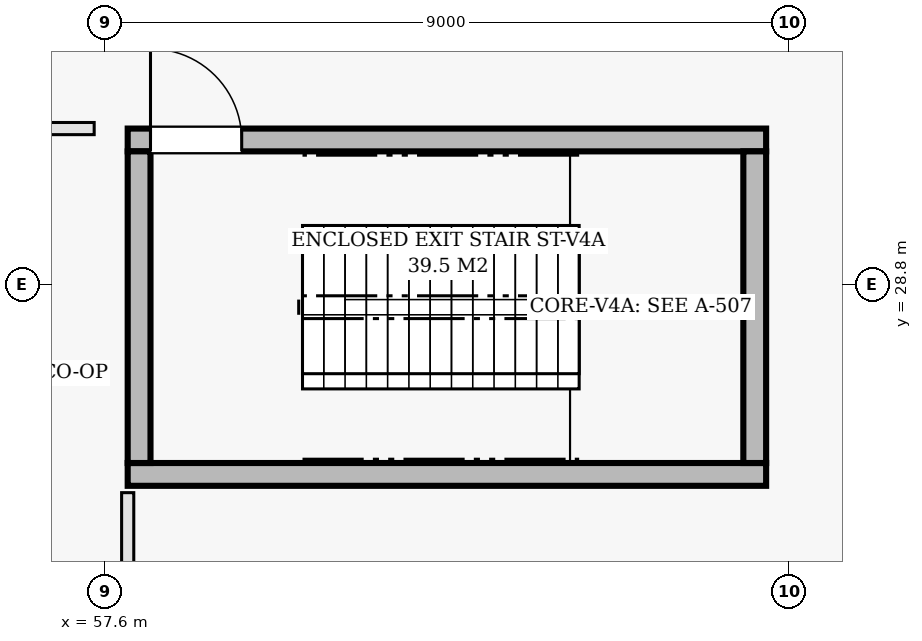
"""IFC4 building model, lengths in metres.
Left out: names, types, materials, properties, quantities, classifications, styles, units other than length and angle.
Written with IfcOpenShell. Run it as: python <this file> out.ifc"""

import sys

from ifc_helpers import new_model, si_unit, direction, frame, frame_2d, origin, place, context, subcontext, project, spatial, rectangle, extrude, element, fill, save


model = new_model("IFC4")
c1 = context("Model", 3, precision=1e-05, world=origin(), true_north=direction((0.0, 1.0)))
c2 = subcontext(c1, "Body", "Model", "MODEL_VIEW")
j1 = project(units=[si_unit("LENGTHUNIT", "METRE"), si_unit("PLANEANGLEUNIT", "RADIAN")], contexts=[c1])
p1 = place(None, origin())
s1 = spatial("IfcSite", under=j1, at=p1, CompositionType="ELEMENT")
p2 = place(p1, origin())
s2 = spatial("IfcBuilding", under=s1, at=p2, CompositionType="ELEMENT")
p3 = place(p2, origin())
s3 = spatial("IfcBuildingStorey", under=s2, at=p3, CompositionType="ELEMENT", Elevation=0.0)
p4 = place(p3, frame((57.9, 26.3, 0.0), z_axis=(0.0, 0.0, 1.0), x_axis=(1.0, 0.0, 0.0)))
e1 = element("IfcWall", 1, at=p4, inside=s3, PredefinedType="SHEAR", context=c2, shape_type="SweptSolid", body=[
    extrude(rectangle(XDim=8.4, YDim=0.3, at=frame_2d((4.2, 0.0))), origin(), (0.0, 0.0, 1.0), 4.52),
])
p5 = place(p3, frame((57.9, 30.7, 0.0), z_axis=(0.0, 0.0, 1.0), x_axis=(1.0, 0.0, 0.0)))
e2 = element("IfcWall", 2, at=p5, inside=s3, PredefinedType="SHEAR", context=c2, shape_type="SweptSolid", body=[
    extrude(rectangle(XDim=8.4, YDim=0.3, at=frame_2d((4.2, 0.0))), origin(), (0.0, 0.0, 1.0), 4.52),
])
p6 = place(p5, frame((0.3, 0.0, 0.0)))
e3 = element("IfcOpeningElement", 3, at=p6, cuts=e2, PredefinedType="OPENING", context=c2, shape_type="SweptSolid", body=[
    extrude(rectangle(XDim=1.2, YDim=2.15, at=frame_2d((0.6, 1.075))), frame((0.0, 0.16, 0.0), z_axis=(0.0, -1.0, 0.0), x_axis=(1.0, 0.0, 0.0)), (0.0, 0.0, 1.0), 0.32),
])
for number, where, z_axis, x_axis in (
    (4, (58.05, 26.45, 0.0), (0.0, 0.0, 1.0), (0.0, 1.0, 0.0)),
    (5, (66.15, 26.45, 0.0), (0.0, 0.0, 1.0), (0.0, 1.0, 0.0)),
):
    element("IfcWall", number, at=place(p3, frame(where, z_axis=z_axis, x_axis=x_axis)), inside=s3, PredefinedType="SHEAR", context=c2, shape_type="SweptSolid", body=[
        extrude(rectangle(XDim=4.1, YDim=0.3, at=frame_2d((2.05, 0.0))), origin(), (0.0, 0.0, 1.0), 4.52),
    ])
p7 = place(p3, frame((54.146, 30.85, 0.0), z_axis=(0.0, 0.0, 1.0), x_axis=(1.0, 0.0, 0.0)))
e6 = element("IfcWall", 6, at=p7, inside=s3, PredefinedType="PARTITIONING", context=c2, shape_type="SweptSolid", body=[
    extrude(rectangle(XDim=3.313, YDim=0.16, at=frame_2d((1.656, 0.0))), origin(), (0.0, 0.0, 1.0), 3.605),
])
p8 = place(p7, frame((1.107, 0.0, 0.0)))
e7 = element("IfcOpeningElement", 7, at=p8, cuts=e6, PredefinedType="OPENING", context=c2, shape_type="SweptSolid", body=[
    extrude(rectangle(XDim=1.1, YDim=2.15, at=frame_2d((0.55, 1.075))), frame((0.0, 0.09, 0.0), z_axis=(0.0, -1.0, 0.0), x_axis=(1.0, 0.0, 0.0)), (0.0, 0.0, 1.0), 0.18),
])
p9 = place(p3, frame((57.9, 24.655, 0.0), z_axis=(0.0, 0.0, 1.0), x_axis=(0.0, 1.0, 0.0)))
e8 = element("IfcWall", 8, at=p9, inside=s3, PredefinedType="PARTITIONING", context=c2, shape_type="SweptSolid", body=[
    extrude(rectangle(XDim=1.405, YDim=0.16, at=frame_2d((0.703, 0.0))), origin(), (0.0, 0.0, 1.0), 3.605),
])
p10 = place(p6, origin())
e9 = element("IfcDoor", 9, at=p10, inside=s3, OperationType="SINGLE_SWING_LEFT", PredefinedType="DOOR", context=c2, shape_type="SweptSolid", body=[
    extrude(rectangle(XDim=1.2, YDim=2.15, at=frame_2d((0.6, 1.075))), frame((0.0, 0.025, 0.0), z_axis=(0.0, -1.0, 0.0), x_axis=(1.0, 0.0, 0.0)), (0.0, 0.0, 1.0), 0.05),
])
fill(e3, e9)
save(model, sys.argv[1])
